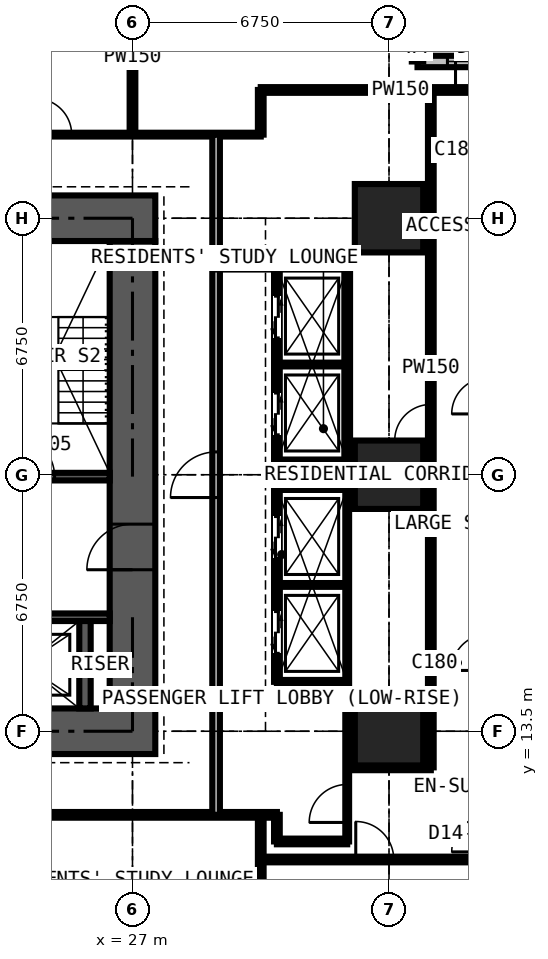
"""IFC4 building model, lengths in metres.
Left out: names, types, materials, properties, quantities, classifications, styles, units other than length and angle.
Written with IfcOpenShell. Run it as: python <this file> out.ifc"""

import sys

from ifc_helpers import new_model, si_unit, direction, frame, frame_2d, origin, origin_2d, place, context, subcontext, project, spatial, rectangle, extrude, element, fill, save


model = new_model("IFC4")
c1 = context("Model", 3, precision=1e-05, world=origin(), true_north=direction((0.0, 1.0)))
c2 = subcontext(c1, "Body", "Model", "MODEL_VIEW")
j1 = project(units=[si_unit("LENGTHUNIT", "METRE"), si_unit("PLANEANGLEUNIT", "RADIAN")], contexts=[c1])
p1 = place(None, origin())
s1 = spatial("IfcSite", under=j1, at=p1, CompositionType="ELEMENT")
p2 = place(p1, origin())
s2 = spatial("IfcBuilding", under=s1, at=p2, CompositionType="ELEMENT")
p3 = place(p2, frame((0.0, 0.0, 105.3)))
s3 = spatial("IfcBuildingStorey", under=s2, at=p3, CompositionType="ELEMENT", Elevation=105.3)
for number, where, z_axis, x_axis in (
    (1, (33.75, 13.5, 0.0), (0.0, 0.0, 1.0), (1.0, 0.0, 0.0)),
    (2, (33.75, 20.25, 0.0), (0.0, 0.0, 1.0), (1.0, 0.0, 0.0)),
    (3, (33.75, 27.0, 0.0), (0.0, 0.0, 1.0), (1.0, 0.0, 0.0)),
):
    element("IfcColumn", number, at=place(p3, frame(where, z_axis=z_axis, x_axis=x_axis)), inside=s3, PredefinedType="COLUMN", context=c2, shape_type="SweptSolid", body=[
        extrude(rectangle(XDim=1.8, YDim=1.8, at=origin_2d()), origin(), (0.0, 0.0, 1.0), 3.6),
    ])
p4 = place(p3, frame((12.9, 13.5, 0.0), z_axis=(0.0, 0.0, 1.0), x_axis=(1.0, 0.0, 0.0)))
e4 = element("IfcWall", 4, at=p4, inside=s3, PredefinedType="SHEAR", context=c2, shape_type="SweptSolid", body=[
    extrude(rectangle(XDim=14.7, YDim=1.2, at=frame_2d((7.35, 0.0))), origin(), (0.0, 0.0, 1.0), 3.6),
])
p5 = place(p3, frame((27.0, 14.1, 0.0), z_axis=(0.0, 0.0, 1.0), x_axis=(0.0, 1.0, 0.0)))
e5 = element("IfcWall", 5, at=p5, inside=s3, PredefinedType="SHEAR", context=c2, shape_type="SweptSolid", body=[
    extrude(rectangle(XDim=12.3, YDim=1.2, at=frame_2d((6.15, 0.0))), origin(), (0.0, 0.0, 1.0), 3.6),
])
p6 = place(p5, frame((3.65, 0.0, 0.0)))
e6 = element("IfcOpeningElement", 6, at=p6, cuts=e5, PredefinedType="OPENING", context=c2, shape_type="SweptSolid", body=[
    extrude(rectangle(XDim=1.2, YDim=2.2, at=frame_2d((0.6, 1.1))), frame((0.0, 0.61, 0.0), z_axis=(0.0, -1.0, 0.0), x_axis=(1.0, 0.0, 0.0)), (0.0, 0.0, 1.0), 1.22),
])
p7 = place(p3, frame((27.6, 27.0, 0.0), z_axis=(0.0, 0.0, 1.0), x_axis=(-1.0, 0.0, 0.0)))
e7 = element("IfcWall", 7, at=p7, inside=s3, PredefinedType="SHEAR", context=c2, shape_type="SweptSolid", body=[
    extrude(rectangle(XDim=14.7, YDim=1.2, at=frame_2d((7.35, 0.0))), origin(), (0.0, 0.0, 1.0), 3.6),
])
p8 = place(p7, frame((5.225, 0.0, 0.0)))
e8 = element("IfcOpeningElement", 8, at=p8, cuts=e7, PredefinedType="OPENING", context=c2, shape_type="SweptSolid", body=[
    extrude(rectangle(XDim=0.9, YDim=2.2, at=frame_2d((0.45, 1.1))), frame((0.0, 0.61, 0.0), z_axis=(0.0, -1.0, 0.0), x_axis=(1.0, 0.0, 0.0)), (0.0, 0.0, 1.0), 1.22),
])
p9 = place(p7, frame((8.2, 0.0, 0.0)))
e9 = element("IfcOpeningElement", 9, at=p9, cuts=e7, PredefinedType="OPENING", context=c2, shape_type="SweptSolid", body=[
    extrude(rectangle(XDim=1.0, YDim=2.2, at=frame_2d((0.5, 1.1))), frame((0.0, 0.61, 0.0), z_axis=(0.0, -1.0, 0.0), x_axis=(1.0, 0.0, 0.0)), (0.0, 0.0, 1.0), 1.22),
])
p10 = place(p3, frame((37.875, 31.125, 0.0), z_axis=(0.0, 0.0, 1.0), x_axis=(-1.0, 0.0, 0.0)))
e10 = element("IfcWall", 10, at=p10, inside=s3, PredefinedType="SOLIDWALL", context=c2, shape_type="SweptSolid", body=[
    extrude(rectangle(XDim=3.375, YDim=0.3, at=frame_2d((1.688, 0.0))), origin(), (0.0, 0.0, 1.0), 3.375),
])
p11 = place(p10, frame((0.788, 0.0, 0.6)))
e11 = element("IfcOpeningElement", 11, at=p11, cuts=e10, PredefinedType="OPENING", context=c2, shape_type="SweptSolid", body=[
    extrude(rectangle(XDim=1.8, YDim=2.1, at=frame_2d((0.9, 1.05))), frame((0.0, 0.16, 0.0), z_axis=(0.0, -1.0, 0.0), x_axis=(1.0, 0.0, 0.0)), (0.0, 0.0, 1.0), 0.32),
])
p12 = place(p3, frame((34.5, 31.125, 0.0), z_axis=(0.0, 0.0, 1.0), x_axis=(0.0, 1.0, 0.0)))
e12 = element("IfcWall", 12, at=p12, inside=s3, PredefinedType="SOLIDWALL", context=c2, shape_type="SweptSolid", body=[
    extrude(rectangle(XDim=3.375, YDim=0.3, at=frame_2d((1.688, 0.0))), origin(), (0.0, 0.0, 1.0), 3.375),
])
p13 = place(p12, frame((0.343, 0.0, 0.9)))
e13 = element("IfcOpeningElement", 13, at=p13, cuts=e12, PredefinedType="OPENING", context=c2, shape_type="SweptSolid", body=[
    extrude(rectangle(XDim=1.2, YDim=1.8, at=frame_2d((0.6, 0.9))), frame((0.0, 0.16, 0.0), z_axis=(0.0, -1.0, 0.0), x_axis=(1.0, 0.0, 0.0)), (0.0, 0.0, 1.0), 0.32),
])
p14 = place(p3, frame((14.1, 16.5, 0.0), z_axis=(0.0, 0.0, 1.0), x_axis=(1.0, 0.0, 0.0)))
e14 = element("IfcWall", 14, at=p14, inside=s3, PredefinedType="SHEAR", context=c2, shape_type="SweptSolid", body=[
    extrude(rectangle(XDim=12.3, YDim=0.2, at=frame_2d((6.15, 0.0))), origin(), (0.0, 0.0, 1.0), 3.6),
])
p15 = place(p14, frame((0.9, 0.0, 0.0)))
e15 = element("IfcOpeningElement", 15, at=p15, cuts=e14, PredefinedType="OPENING", context=c2, shape_type="SweptSolid", body=[
    extrude(rectangle(XDim=1.1, YDim=2.2, at=frame_2d((0.55, 1.1))), frame((0.0, 0.11, 0.0), z_axis=(0.0, -1.0, 0.0), x_axis=(1.0, 0.0, 0.0)), (0.0, 0.0, 1.0), 0.22),
])
p16 = place(p14, frame((9.5, 0.0, 0.0)))
e16 = element("IfcOpeningElement", 16, at=p16, cuts=e14, PredefinedType="OPENING", context=c2, shape_type="SweptSolid", body=[
    extrude(rectangle(XDim=1.1, YDim=2.2, at=frame_2d((0.55, 1.1))), frame((0.0, 0.11, 0.0), z_axis=(0.0, -1.0, 0.0), x_axis=(1.0, 0.0, 0.0)), (0.0, 0.0, 1.0), 0.22),
])
p17 = place(p3, frame((14.1, 20.2, 0.0), z_axis=(0.0, 0.0, 1.0), x_axis=(1.0, 0.0, 0.0)))
e17 = element("IfcWall", 17, at=p17, inside=s3, PredefinedType="SHEAR", context=c2, shape_type="SweptSolid", body=[
    extrude(rectangle(XDim=12.3, YDim=0.2, at=frame_2d((6.15, 0.0))), origin(), (0.0, 0.0, 1.0), 3.6),
])
p18 = place(p17, frame((0.35, 0.0, 0.0)))
e18 = element("IfcOpeningElement", 18, at=p18, cuts=e17, PredefinedType="OPENING", context=c2, shape_type="SweptSolid", body=[
    extrude(rectangle(XDim=1.1, YDim=2.2, at=frame_2d((0.55, 1.1))), frame((0.0, 0.11, 0.0), z_axis=(0.0, -1.0, 0.0), x_axis=(1.0, 0.0, 0.0)), (0.0, 0.0, 1.0), 0.22),
])
p19 = place(p17, frame((9.75, 0.0, 0.0)))
e19 = element("IfcOpeningElement", 19, at=p19, cuts=e17, PredefinedType="OPENING", context=c2, shape_type="SweptSolid", body=[
    extrude(rectangle(XDim=1.1, YDim=2.2, at=frame_2d((0.55, 1.1))), frame((0.0, 0.11, 0.0), z_axis=(0.0, -1.0, 0.0), x_axis=(1.0, 0.0, 0.0)), (0.0, 0.0, 1.0), 0.22),
])
p20 = place(p3, frame((25.75, 14.1, 0.0), z_axis=(0.0, 0.0, 1.0), x_axis=(0.0, 1.0, 0.0)))
e20 = element("IfcWall", 20, at=p20, inside=s3, PredefinedType="SHEAR", context=c2, shape_type="SweptSolid", body=[
    extrude(rectangle(XDim=2.3, YDim=0.3, at=frame_2d((1.15, 0.0))), origin(), (0.0, 0.0, 1.0), 3.6),
])
p21 = place(p3, frame((10.125, 11.3, 0.0), z_axis=(0.0, 0.0, 1.0), x_axis=(1.0, 0.0, 0.0)))
e21 = element("IfcWall", 21, at=p21, inside=s3, PredefinedType="PARTITIONING", context=c2, shape_type="SweptSolid", body=[
    extrude(rectangle(XDim=20.675, YDim=0.15, at=frame_2d((10.337, 0.0))), origin(), (0.0, 0.0, 1.0), 3.375),
])
p22 = place(p21, frame((1.775, 0.0, 0.0)))
e22 = element("IfcOpeningElement", 22, at=p22, cuts=e21, PredefinedType="OPENING", context=c2, shape_type="SweptSolid", body=[
    extrude(rectangle(XDim=1.0, YDim=2.2, at=frame_2d((0.5, 1.1))), frame((0.0, 0.085, 0.0), z_axis=(0.0, -1.0, 0.0), x_axis=(1.0, 0.0, 0.0)), (0.0, 0.0, 1.0), 0.17),
])
p23 = place(p21, frame((11.312, 0.0, 0.0)))
e23 = element("IfcOpeningElement", 23, at=p23, cuts=e21, PredefinedType="OPENING", context=c2, shape_type="SweptSolid", body=[
    extrude(rectangle(XDim=1.0, YDim=2.2, at=frame_2d((0.5, 1.1))), frame((0.0, 0.085, 0.0), z_axis=(0.0, -1.0, 0.0), x_axis=(1.0, 0.0, 0.0)), (0.0, 0.0, 1.0), 0.17),
])
p24 = place(p3, frame((11.3, 29.2, 0.0), z_axis=(0.0, 0.0, 1.0), x_axis=(1.0, 0.0, 0.0)))
e24 = element("IfcWall", 24, at=p24, inside=s3, PredefinedType="PARTITIONING", context=c2, shape_type="SweptSolid", body=[
    extrude(rectangle(XDim=19.075, YDim=0.1, at=frame_2d((9.538, 0.0))), origin(), (0.0, 0.0, 1.0), 3.375),
])
p25 = place(p24, frame((6.4, 0.0, 0.0)))
e25 = element("IfcOpeningElement", 25, at=p25, cuts=e24, PredefinedType="OPENING", context=c2, shape_type="SweptSolid", body=[
    extrude(rectangle(XDim=0.95, YDim=2.2, at=frame_2d((0.475, 1.1))), frame((0.0, 0.06, 0.0), z_axis=(0.0, -1.0, 0.0), x_axis=(1.0, 0.0, 0.0)), (0.0, 0.0, 1.0), 0.12),
])
p26 = place(p24, frame((13.15, 0.0, 0.0)))
e26 = element("IfcOpeningElement", 26, at=p26, cuts=e24, PredefinedType="OPENING", context=c2, shape_type="SweptSolid", body=[
    extrude(rectangle(XDim=0.95, YDim=2.2, at=frame_2d((0.475, 1.1))), frame((0.0, 0.06, 0.0), z_axis=(0.0, -1.0, 0.0), x_axis=(1.0, 0.0, 0.0)), (0.0, 0.0, 1.0), 0.12),
])
p27 = place(p24, frame((0.6, 0.0, 0.0)))
e27 = element("IfcOpeningElement", 27, at=p27, cuts=e24, PredefinedType="OPENING", context=c2, shape_type="SweptSolid", body=[
    extrude(rectangle(XDim=1.0, YDim=2.2, at=frame_2d((0.5, 1.1))), frame((0.0, 0.06, 0.0), z_axis=(0.0, -1.0, 0.0), x_axis=(1.0, 0.0, 0.0)), (0.0, 0.0, 1.0), 0.12),
])
p28 = place(p3, frame((27.0, 29.2, 0.0), z_axis=(0.0, 0.0, 1.0), x_axis=(0.0, 1.0, 0.0)))
e28 = element("IfcWall", 28, at=p28, inside=s3, PredefinedType="PARTITIONING", context=c2, shape_type="SweptSolid", body=[
    extrude(rectangle(XDim=5.284, YDim=0.15, at=frame_2d((2.642, 0.0))), origin(), (0.0, 0.0, 1.0), 2.61),
])
p29 = place(p3, frame((29.2, 11.3, 0.0), z_axis=(0.0, 0.0, 1.0), x_axis=(0.0, 1.0, 0.0)))
e29 = element("IfcWall", 29, at=p29, inside=s3, PredefinedType="PARTITIONING", context=c2, shape_type="SweptSolid", body=[
    extrude(rectangle(XDim=17.9, YDim=0.2, at=frame_2d((8.95, 0.0))), origin(), (0.0, 0.0, 1.0), 3.375),
])
p30 = place(p29, frame((8.35, 0.0, 0.0)))
e30 = element("IfcOpeningElement", 30, at=p30, cuts=e29, PredefinedType="OPENING", context=c2, shape_type="SweptSolid", body=[
    extrude(rectangle(XDim=1.2, YDim=2.2, at=frame_2d((0.6, 1.1))), frame((0.0, 0.11, 0.0), z_axis=(0.0, -1.0, 0.0), x_axis=(1.0, 0.0, 0.0)), (0.0, 0.0, 1.0), 0.22),
])
p31 = place(p3, frame((29.2, 25.7, 0.0), z_axis=(0.0, 0.0, 1.0), x_axis=(1.0, 0.0, 0.0)))
e31 = element("IfcWall", 31, at=p31, inside=s3, PredefinedType="SHEAR", context=c2, shape_type="SweptSolid", body=[
    extrude(rectangle(XDim=3.45, YDim=0.1, at=frame_2d((1.725, 0.0))), origin(), (0.0, 0.0, 1.0), 3.375),
])
p32 = place(p3, frame((30.375, -0.734, 0.0), z_axis=(0.0, 0.0, 1.0), x_axis=(0.0, 1.0, 0.0)))
e32 = element("IfcWall", 32, at=p32, inside=s3, PredefinedType="PARTITIONING", context=c2, shape_type="SweptSolid", body=[
    extrude(rectangle(XDim=12.034, YDim=0.15, at=frame_2d((6.017, 0.0))), origin(), (0.0, 0.0, 1.0), 3.375),
])
p33 = place(p3, frame((30.375, 10.125, 0.0), z_axis=(0.0, 0.0, 1.0), x_axis=(1.0, 0.0, 0.0)))
e33 = element("IfcWall", 33, at=p33, inside=s3, PredefinedType="PARTITIONING", context=c2, shape_type="SweptSolid", body=[
    extrude(rectangle(XDim=10.859, YDim=0.15, at=frame_2d((5.429, 0.0))), origin(), (0.0, 0.0, 1.0), 3.375),
])
p34 = place(p33, frame((2.5, 0.0, 0.0)))
e34 = element("IfcOpeningElement", 34, at=p34, cuts=e33, PredefinedType="OPENING", context=c2, shape_type="SweptSolid", body=[
    extrude(rectangle(XDim=1.0, YDim=2.2, at=frame_2d((0.5, 1.1))), frame((0.0, 0.085, 0.0), z_axis=(0.0, -1.0, 0.0), x_axis=(1.0, 0.0, 0.0)), (0.0, 0.0, 1.0), 0.17),
])
p35 = place(p3, frame((30.375, 29.2, 0.0), z_axis=(0.0, 0.0, 1.0), x_axis=(0.0, 1.0, 0.0)))
e35 = element("IfcWall", 35, at=p35, inside=s3, PredefinedType="PARTITIONING", context=c2, shape_type="SweptSolid", body=[
    extrude(rectangle(XDim=1.175, YDim=0.15, at=frame_2d((0.587, 0.0))), origin(), (0.0, 0.0, 1.0), 3.375),
])
p36 = place(p3, frame((30.375, 30.375, 0.0), z_axis=(0.0, 0.0, 1.0), x_axis=(1.0, 0.0, 0.0)))
e36 = element("IfcWall", 36, at=p36, inside=s3, PredefinedType="PARTITIONING", context=c2, shape_type="SweptSolid", body=[
    extrude(rectangle(XDim=7.35, YDim=0.15, at=frame_2d((3.675, 0.0))), origin(), (0.0, 0.0, 1.0), 2.877),
])
p37 = place(p36, frame((5.125, 0.0, 0.0)))
e37 = element("IfcOpeningElement", 37, at=p37, cuts=e36, PredefinedType="OPENING", context=c2, shape_type="SweptSolid", body=[
    extrude(rectangle(XDim=1.0, YDim=2.2, at=frame_2d((0.5, 1.1))), frame((0.0, 0.085, 0.0), z_axis=(0.0, -1.0, 0.0), x_axis=(1.0, 0.0, 0.0)), (0.0, 0.0, 1.0), 0.17),
])
p38 = place(p3, frame((30.8, 10.6, 0.0), z_axis=(0.0, 0.0, 1.0), x_axis=(0.0, 1.0, 0.0)))
e38 = element("IfcWall", 38, at=p38, inside=s3, PredefinedType="PARTITIONING", context=c2, shape_type="SweptSolid", body=[
    extrude(rectangle(XDim=0.7, YDim=0.15, at=frame_2d((0.35, 0.0))), origin(), (0.0, 0.0, 1.0), 3.375),
])
p39 = place(p3, frame((30.8, 10.6, 0.0), z_axis=(0.0, 0.0, 1.0), x_axis=(1.0, 0.0, 0.0)))
e39 = element("IfcWall", 39, at=p39, inside=s3, PredefinedType="PARTITIONING", context=c2, shape_type="SweptSolid", body=[
    extrude(rectangle(XDim=1.85, YDim=0.15, at=frame_2d((0.925, 0.0))), origin(), (0.0, 0.0, 1.0), 3.375),
])
p40 = place(p3, frame((30.8, 14.8, 0.0), z_axis=(0.0, 0.0, 1.0), x_axis=(0.0, 1.0, 0.0)))
e40 = element("IfcWall", 40, at=p40, inside=s3, PredefinedType="PARTITIONING", context=c2, shape_type="SweptSolid", body=[
    extrude(rectangle(XDim=10.9, YDim=0.15, at=frame_2d((5.45, 0.0))), origin(), (0.0, 0.0, 1.0), 3.375),
])
p41 = place(p40, frame((0.75, 0.0, 0.0)))
e41 = element("IfcOpeningElement", 41, at=p41, cuts=e40, PredefinedType="OPENING", context=c2, shape_type="SweptSolid", body=[
    extrude(rectangle(XDim=1.1, YDim=2.2, at=frame_2d((0.55, 1.1))), frame((0.0, 0.085, 0.0), z_axis=(0.0, -1.0, 0.0), x_axis=(1.0, 0.0, 0.0)), (0.0, 0.0, 1.0), 0.17),
])
p42 = place(p40, frame((3.25, 0.0, 0.0)))
e42 = element("IfcOpeningElement", 42, at=p42, cuts=e40, PredefinedType="OPENING", context=c2, shape_type="SweptSolid", body=[
    extrude(rectangle(XDim=1.1, YDim=2.2, at=frame_2d((0.55, 1.1))), frame((0.0, 0.085, 0.0), z_axis=(0.0, -1.0, 0.0), x_axis=(1.0, 0.0, 0.0)), (0.0, 0.0, 1.0), 0.17),
])
p43 = place(p40, frame((6.5, 0.0, 0.0)))
e43 = element("IfcOpeningElement", 43, at=p43, cuts=e40, PredefinedType="OPENING", context=c2, shape_type="SweptSolid", body=[
    extrude(rectangle(XDim=1.1, YDim=2.2, at=frame_2d((0.55, 1.1))), frame((0.0, 0.085, 0.0), z_axis=(0.0, -1.0, 0.0), x_axis=(1.0, 0.0, 0.0)), (0.0, 0.0, 1.0), 0.17),
])
p44 = place(p40, frame((9.05, 0.0, 0.0)))
e44 = element("IfcOpeningElement", 44, at=p44, cuts=e40, PredefinedType="OPENING", context=c2, shape_type="SweptSolid", body=[
    extrude(rectangle(XDim=1.1, YDim=2.2, at=frame_2d((0.55, 1.1))), frame((0.0, 0.085, 0.0), z_axis=(0.0, -1.0, 0.0), x_axis=(1.0, 0.0, 0.0)), (0.0, 0.0, 1.0), 0.17),
])
for number, where, z_axis, x_axis in (
    (45, (30.8, 14.8, 0.0), (0.0, 0.0, 1.0), (1.0, 0.0, 0.0)),
    (46, (30.8, 17.35, 0.0), (0.0, 0.0, 1.0), (1.0, 0.0, 0.0)),
    (47, (30.8, 19.9, 0.0), (0.0, 0.0, 1.0), (1.0, 0.0, 0.0)),
    (48, (30.8, 20.6, 0.0), (0.0, 0.0, 1.0), (1.0, 0.0, 0.0)),
    (49, (30.8, 23.15, 0.0), (0.0, 0.0, 1.0), (1.0, 0.0, 0.0)),
):
    element("IfcWall", number, at=place(p3, frame(where, z_axis=z_axis, x_axis=x_axis)), inside=s3, PredefinedType="SHEAR", context=c2, shape_type="SweptSolid", body=[
        extrude(rectangle(XDim=1.85, YDim=0.1, at=frame_2d((0.925, 0.0))), origin(), (0.0, 0.0, 1.0), 3.375),
    ])
p45 = place(p3, frame((32.65, 10.6, 0.0), z_axis=(0.0, 0.0, 1.0), x_axis=(0.0, 1.0, 0.0)))
e50 = element("IfcWall", 50, at=p45, inside=s3, PredefinedType="SHEAR", context=c2, shape_type="SweptSolid", body=[
    extrude(rectangle(XDim=9.3, YDim=0.1, at=frame_2d((4.65, 0.0))), origin(), (0.0, 0.0, 1.0), 3.375),
])
p46 = place(p45, frame((0.5, 0.0, 0.0)))
e51 = element("IfcOpeningElement", 51, at=p46, cuts=e50, PredefinedType="OPENING", context=c2, shape_type="SweptSolid", body=[
    extrude(rectangle(XDim=1.0, YDim=2.2, at=frame_2d((0.5, 1.1))), frame((0.0, 0.06, 0.0), z_axis=(0.0, -1.0, 0.0), x_axis=(1.0, 0.0, 0.0)), (0.0, 0.0, 1.0), 0.12),
])
p47 = place(p3, frame((32.65, 12.55, 0.0), z_axis=(0.0, 0.0, 1.0), x_axis=(1.0, 0.0, 0.0)))
e52 = element("IfcWall", 52, at=p47, inside=s3, PredefinedType="PARTITIONING", context=c2, shape_type="SweptSolid", body=[
    extrude(rectangle(XDim=2.2, YDim=0.15, at=frame_2d((1.1, 0.0))), origin(), (0.0, 0.0, 1.0), 3.375),
])
p48 = place(p3, frame((32.65, 20.6, 0.0), z_axis=(0.0, 0.0, 1.0), x_axis=(0.0, 1.0, 0.0)))
e53 = element("IfcWall", 53, at=p48, inside=s3, PredefinedType="PARTITIONING", context=c2, shape_type="SweptSolid", body=[
    extrude(rectangle(XDim=5.1, YDim=0.15, at=frame_2d((2.55, 0.0))), origin(), (0.0, 0.0, 1.0), 3.375),
])
p49 = place(p3, frame((34.85, 12.55, 0.0), z_axis=(0.0, 0.0, 1.0), x_axis=(0.0, 1.0, 0.0)))
e54 = element("IfcWall", 54, at=p49, inside=s3, PredefinedType="PARTITIONING", context=c2, shape_type="SweptSolid", body=[
    extrude(rectangle(XDim=17.825, YDim=0.15, at=frame_2d((8.913, 0.0))), origin(), (0.0, 0.0, 1.0), 3.375),
])
p50 = place(p49, frame((8.6, 0.0, 0.0)))
e55 = element("IfcOpeningElement", 55, at=p50, cuts=e54, PredefinedType="OPENING", context=c2, shape_type="SweptSolid", body=[
    extrude(rectangle(XDim=0.95, YDim=2.2, at=frame_2d((0.475, 1.1))), frame((0.0, 0.085, 0.0), z_axis=(0.0, -1.0, 0.0), x_axis=(1.0, 0.0, 0.0)), (0.0, 0.0, 1.0), 0.17),
])
p51 = place(p11, origin())
e56 = element("IfcWindow", 56, at=p51, inside=s3, PartitioningType="SINGLE_PANEL", PredefinedType="WINDOW", context=c2, shape_type="SweptSolid", body=[
    extrude(rectangle(XDim=1.8, YDim=2.1, at=frame_2d((0.9, 1.05))), frame((0.0, 0.03, 0.0), z_axis=(0.0, -1.0, 0.0), x_axis=(1.0, 0.0, 0.0)), (0.0, 0.0, 1.0), 0.06),
])
fill(e11, e56)
p52 = place(p6, origin())
e57 = element("IfcDoor", 57, at=p52, inside=s3, OperationType="DOUBLE_DOOR_SINGLE_SWING", PredefinedType="DOOR", context=c2, shape_type="SweptSolid", body=[
    extrude(rectangle(XDim=1.2, YDim=2.2, at=frame_2d((0.6, 1.1))), frame((0.0, 0.025, 0.0), z_axis=(0.0, -1.0, 0.0), x_axis=(1.0, 0.0, 0.0)), (0.0, 0.0, 1.0), 0.05),
])
fill(e6, e57)
p53 = place(p19, origin())
e58 = element("IfcDoor", 58, at=p53, inside=s3, OperationType="SINGLE_SWING_LEFT", PredefinedType="DOOR", context=c2, shape_type="SweptSolid", body=[
    extrude(rectangle(XDim=1.1, YDim=2.2, at=frame_2d((0.55, 1.1))), frame((0.0, 0.025, 0.0), z_axis=(0.0, -1.0, 0.0), x_axis=(1.0, 0.0, 0.0)), (0.0, 0.0, 1.0), 0.05),
])
fill(e19, e58)
p54 = place(p34, origin())
e59 = element("IfcDoor", 59, at=p54, inside=s3, OperationType="SINGLE_SWING_LEFT", PredefinedType="DOOR", context=c2, shape_type="SweptSolid", body=[
    extrude(rectangle(XDim=1.0, YDim=2.2, at=frame_2d((0.5, 1.1))), frame((0.0, 0.025, 0.0), z_axis=(0.0, -1.0, 0.0), x_axis=(1.0, 0.0, 0.0)), (0.0, 0.0, 1.0), 0.05),
])
fill(e34, e59)
p55 = place(p46, origin())
e60 = element("IfcDoor", 60, at=p55, inside=s3, OperationType="SINGLE_SWING_LEFT", PredefinedType="DOOR", context=c2, shape_type="SweptSolid", body=[
    extrude(rectangle(XDim=1.0, YDim=2.2, at=frame_2d((0.5, 1.1))), frame((0.0, 0.025, 0.0), z_axis=(0.0, -1.0, 0.0), x_axis=(1.0, 0.0, 0.0)), (0.0, 0.0, 1.0), 0.05),
])
fill(e51, e60)
p56 = place(p50, origin())
e61 = element("IfcDoor", 61, at=p56, inside=s3, OperationType="SINGLE_SWING_LEFT", PredefinedType="DOOR", context=c2, shape_type="SweptSolid", body=[
    extrude(rectangle(XDim=0.95, YDim=2.2, at=frame_2d((0.475, 1.1))), frame((0.0, 0.025, 0.0), z_axis=(0.0, -1.0, 0.0), x_axis=(1.0, 0.0, 0.0)), (0.0, 0.0, 1.0), 0.05),
])
fill(e55, e61)
p57 = place(p37, origin())
e62 = element("IfcDoor", 62, at=p57, inside=s3, OperationType="SINGLE_SWING_LEFT", PredefinedType="DOOR", context=c2, shape_type="SweptSolid", body=[
    extrude(rectangle(XDim=1.0, YDim=2.2, at=frame_2d((0.5, 1.1))), frame((0.0, 0.025, 0.0), z_axis=(0.0, -1.0, 0.0), x_axis=(1.0, 0.0, 0.0)), (0.0, 0.0, 1.0), 0.05),
])
fill(e37, e62)
p58 = place(p26, origin())
e63 = element("IfcDoor", 63, at=p58, inside=s3, OperationType="SINGLE_SWING_LEFT", PredefinedType="DOOR", context=c2, shape_type="SweptSolid", body=[
    extrude(rectangle(XDim=0.95, YDim=2.2, at=frame_2d((0.475, 1.1))), frame((0.0, 0.025, 0.0), z_axis=(0.0, -1.0, 0.0), x_axis=(1.0, 0.0, 0.0)), (0.0, 0.0, 1.0), 0.05),
])
fill(e26, e63)
p59 = place(p41, origin())
e64 = element("IfcDoor", 64, at=p59, inside=s3, OperationType="DOUBLE_DOOR_SLIDING", PredefinedType="DOOR", context=c2, shape_type="SweptSolid", body=[
    extrude(rectangle(XDim=1.1, YDim=2.2, at=frame_2d((0.55, 1.1))), frame((0.0, 0.025, 0.0), z_axis=(0.0, -1.0, 0.0), x_axis=(1.0, 0.0, 0.0)), (0.0, 0.0, 1.0), 0.05),
])
fill(e41, e64)
p60 = place(p42, origin())
e65 = element("IfcDoor", 65, at=p60, inside=s3, OperationType="DOUBLE_DOOR_SLIDING", PredefinedType="DOOR", context=c2, shape_type="SweptSolid", body=[
    extrude(rectangle(XDim=1.1, YDim=2.2, at=frame_2d((0.55, 1.1))), frame((0.0, 0.025, 0.0), z_axis=(0.0, -1.0, 0.0), x_axis=(1.0, 0.0, 0.0)), (0.0, 0.0, 1.0), 0.05),
])
fill(e42, e65)
p61 = place(p43, origin())
e66 = element("IfcDoor", 66, at=p61, inside=s3, OperationType="DOUBLE_DOOR_SLIDING", PredefinedType="DOOR", context=c2, shape_type="SweptSolid", body=[
    extrude(rectangle(XDim=1.1, YDim=2.2, at=frame_2d((0.55, 1.1))), frame((0.0, 0.025, 0.0), z_axis=(0.0, -1.0, 0.0), x_axis=(1.0, 0.0, 0.0)), (0.0, 0.0, 1.0), 0.05),
])
fill(e43, e66)
p62 = place(p44, origin())
e67 = element("IfcDoor", 67, at=p62, inside=s3, OperationType="DOUBLE_DOOR_SLIDING", PredefinedType="DOOR", context=c2, shape_type="SweptSolid", body=[
    extrude(rectangle(XDim=1.1, YDim=2.2, at=frame_2d((0.55, 1.1))), frame((0.0, 0.025, 0.0), z_axis=(0.0, -1.0, 0.0), x_axis=(1.0, 0.0, 0.0)), (0.0, 0.0, 1.0), 0.05),
])
fill(e44, e67)
p63 = place(p30, origin())
e68 = element("IfcDoor", 68, at=p63, inside=s3, OperationType="DOUBLE_DOOR_SINGLE_SWING", PredefinedType="DOOR", context=c2, shape_type="SweptSolid", body=[
    extrude(rectangle(XDim=1.2, YDim=2.2, at=frame_2d((0.6, 1.1))), frame((0.0, 0.025, 0.0), z_axis=(0.0, -1.0, 0.0), x_axis=(1.0, 0.0, 0.0)), (0.0, 0.0, 1.0), 0.05),
])
fill(e30, e68)
save(model, sys.argv[1])
